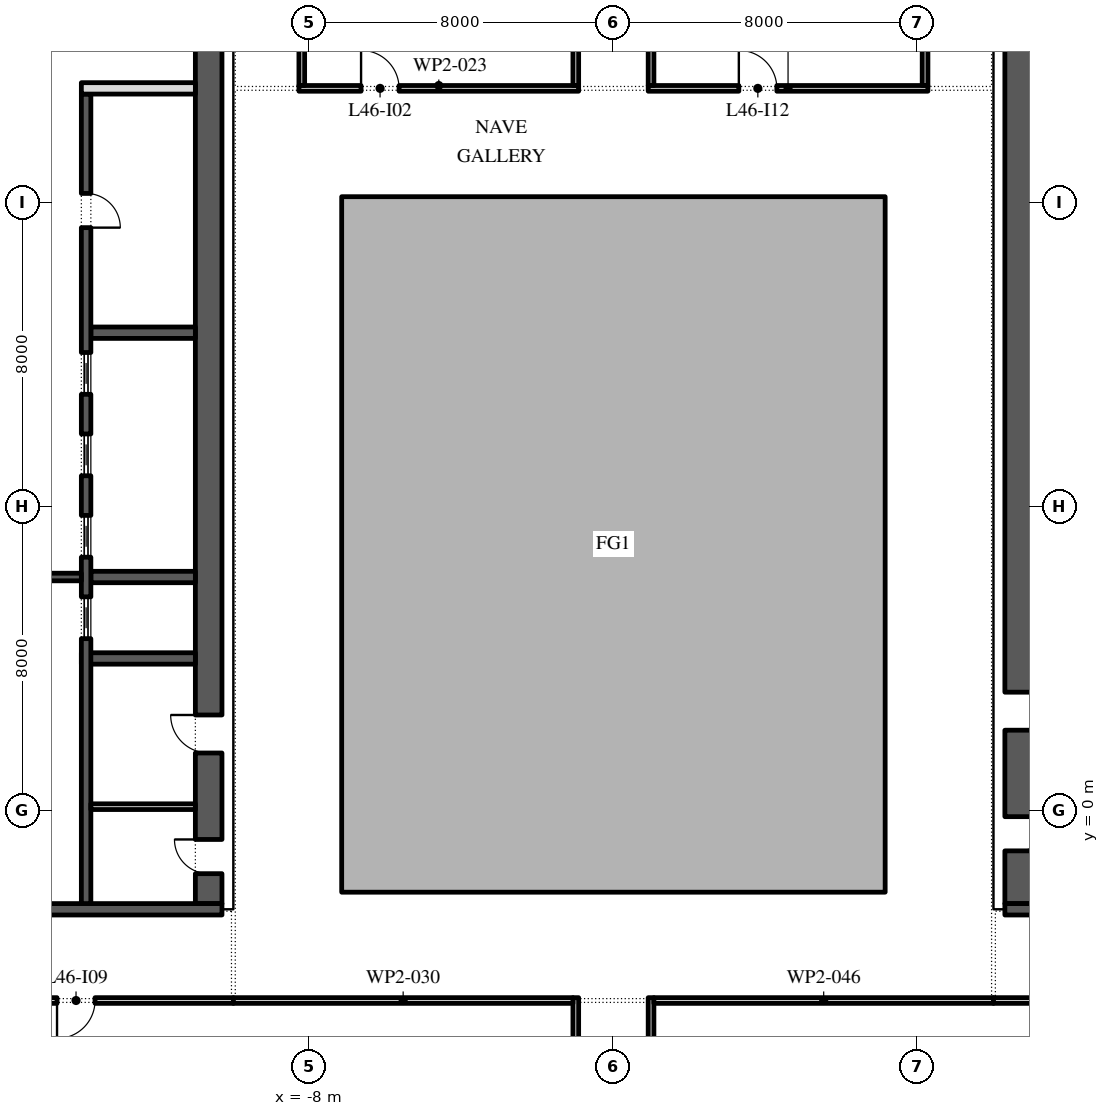
"""IFC4 building model, lengths in metres.
Left out: names, types, materials, properties, quantities, classifications, styles, units other than length and angle.
Written with IfcOpenShell. Run it as: python <this file> out.ifc"""

import sys

from ifc_helpers import new_model, si_unit, direction, frame, frame_2d, origin, place, context, subcontext, project, spatial, polyline, rectangle, outline, extrude, element, fill, save


model = new_model("IFC4")
c1 = context("Model", 3, precision=1e-05, world=origin(), true_north=direction((0.0, 1.0)))
c2 = subcontext(c1, "Body", "Model", "MODEL_VIEW")
j1 = project(units=[si_unit("LENGTHUNIT", "METRE"), si_unit("PLANEANGLEUNIT", "RADIAN")], contexts=[c1])
p1 = place(None, origin())
s1 = spatial("IfcSite", under=j1, at=p1, CompositionType="ELEMENT")
p2 = place(p1, origin())
s2 = spatial("IfcBuilding", under=s1, at=p2, CompositionType="ELEMENT")
p3 = place(p2, frame((0.0, 0.0, 209.4)))
s3 = spatial("IfcBuildingStorey", under=s2, at=p3, CompositionType="ELEMENT", Elevation=209.4)
p4 = place(p3, origin())
e1 = element("IfcWall", 1, at=p4, inside=s3, PredefinedType="STANDARD", context=c2, shape_type="SweptSolid", body=[
    extrude(outline(polyline([(-7.15, -2.15), (7.15, -2.15), (7.15, 16.15), (-7.15, 16.15), (-7.15, -2.15)]), holes=[polyline([(-7.0, -2.0), (-7.0, 16.0), (7.0, 16.0), (7.0, -2.0), (-7.0, -2.0)])]), origin(), (0.0, 0.0, 1.0), 4.0),
])
p5 = place(p3, frame((-10.65, -2.45, 0.0), z_axis=(0.0, 0.0, 1.0), x_axis=(0.0, 1.0, 0.0)))
e2 = element("IfcWall", 2, at=p5, inside=s3, PredefinedType="SHEAR", context=c2, shape_type="SweptSolid", body=[
    extrude(rectangle(XDim=27.9, YDim=0.7, at=frame_2d((13.95, 0.0))), origin(), (0.0, 0.0, 1.0), 4.0),
])
p6 = place(p5, frame((23.65, 0.0, 0.0)))
e3 = element("IfcOpeningElement", 3, at=p6, cuts=e2, PredefinedType="OPENING", context=c2, shape_type="SweptSolid", body=[
    extrude(rectangle(XDim=2.4, YDim=2.1, at=frame_2d((1.2, 1.05))), frame((0.0, 0.36, 0.0), z_axis=(0.0, -1.0, 0.0), x_axis=(1.0, 0.0, 0.0)), (0.0, 0.0, 1.0), 0.72),
])
p7 = place(p5, frame((0.788, 0.0, 0.0)))
e4 = element("IfcOpeningElement", 4, at=p7, cuts=e2, PredefinedType="OPENING", context=c2, shape_type="SweptSolid", body=[
    extrude(rectangle(XDim=0.9, YDim=2.1, at=frame_2d((0.45, 1.05))), frame((0.0, 0.36, 0.0), z_axis=(0.0, -1.0, 0.0), x_axis=(1.0, 0.0, 0.0)), (0.0, 0.0, 1.0), 0.72),
])
p8 = place(p5, frame((3.962, 0.0, 0.0)))
e5 = element("IfcOpeningElement", 5, at=p8, cuts=e2, PredefinedType="OPENING", context=c2, shape_type="SweptSolid", body=[
    extrude(rectangle(XDim=1.0, YDim=2.1, at=frame_2d((0.5, 1.05))), frame((0.0, 0.36, 0.0), z_axis=(0.0, -1.0, 0.0), x_axis=(1.0, 0.0, 0.0)), (0.0, 0.0, 1.0), 0.72),
])
p9 = place(p3, frame((-21.7, -2.6, 0.0), z_axis=(0.0, 0.0, 1.0), x_axis=(1.0, 0.0, 0.0)))
e6 = element("IfcWall", 6, at=p9, inside=s3, PredefinedType="SHEAR", context=c2, shape_type="SweptSolid", body=[
    extrude(rectangle(XDim=11.4, YDim=0.3, at=frame_2d((5.7, 0.0))), origin(), (0.0, 0.0, 1.0), 4.0),
])
p10 = place(p3, frame((-14.0, 4.0, 0.0), z_axis=(0.0, 0.0, 1.0), x_axis=(1.0, 0.0, 0.0)))
e7 = element("IfcWall", 7, at=p10, inside=s3, PredefinedType="SHEAR", context=c2, shape_type="SweptSolid", body=[
    extrude(rectangle(XDim=3.0, YDim=0.3, at=frame_2d((1.5, 0.0))), origin(), (0.0, 0.0, 1.0), 4.0),
])
for number, where, z_axis, x_axis in (
    (8, (-13.75, 6.143, 0.0), (0.0, 0.0, 1.0), (1.0, 0.0, 0.0)),
    (9, (-13.75, 12.571, 0.0), (0.0, 0.0, 1.0), (1.0, 0.0, 0.0)),
):
    element("IfcWall", number, at=place(p3, frame(where, z_axis=z_axis, x_axis=x_axis)), inside=s3, PredefinedType="SHEAR", context=c2, shape_type="SweptSolid", body=[
        extrude(rectangle(XDim=2.75, YDim=0.3, at=frame_2d((1.375, 0.0))), origin(), (0.0, 0.0, 1.0), 4.0),
    ])
p11 = place(p3, frame((-13.875, -2.45, 0.0), z_axis=(0.0, 0.0, 1.0), x_axis=(0.0, 1.0, 0.0)))
e10 = element("IfcWall", 10, at=p11, inside=s3, PredefinedType="SHEAR", context=c2, shape_type="SweptSolid", body=[
    extrude(rectangle(XDim=21.3, YDim=0.25, at=frame_2d((10.65, 0.0))), origin(), (0.0, 0.0, 1.0), 4.0),
])
p12 = place(p11, frame((17.786, 0.0, 0.0)))
e11 = element("IfcOpeningElement", 11, at=p12, cuts=e10, PredefinedType="OPENING", context=c2, shape_type="SweptSolid", body=[
    extrude(rectangle(XDim=0.9, YDim=2.1, at=frame_2d((0.45, 1.05))), frame((0.0, 0.135, 0.0), z_axis=(0.0, -1.0, 0.0), x_axis=(1.0, 0.0, 0.0)), (0.0, 0.0, 1.0), 0.27),
])
p13 = place(p11, frame((6.971, 0.0, 0.0)))
e12 = element("IfcOpeningElement", 12, at=p13, cuts=e10, PredefinedType="OPENING", context=c2, shape_type="SweptSolid", body=[
    extrude(rectangle(XDim=1.1, YDim=2.1, at=frame_2d((0.55, 1.05))), frame((0.0, 0.135, 0.0), z_axis=(0.0, -1.0, 0.0), x_axis=(1.0, 0.0, 0.0)), (0.0, 0.0, 1.0), 0.27),
])
p14 = place(p11, frame((9.114, 0.0, 0.0)))
e13 = element("IfcOpeningElement", 13, at=p14, cuts=e10, PredefinedType="OPENING", context=c2, shape_type="SweptSolid", body=[
    extrude(rectangle(XDim=1.1, YDim=2.1, at=frame_2d((0.55, 1.05))), frame((0.0, 0.135, 0.0), z_axis=(0.0, -1.0, 0.0), x_axis=(1.0, 0.0, 0.0)), (0.0, 0.0, 1.0), 0.27),
])
p15 = place(p11, frame((11.257, 0.0, 0.0)))
e14 = element("IfcOpeningElement", 14, at=p15, cuts=e10, PredefinedType="OPENING", context=c2, shape_type="SweptSolid", body=[
    extrude(rectangle(XDim=1.1, YDim=2.1, at=frame_2d((0.55, 1.05))), frame((0.0, 0.135, 0.0), z_axis=(0.0, -1.0, 0.0), x_axis=(1.0, 0.0, 0.0)), (0.0, 0.0, 1.0), 0.27),
])
p16 = place(p11, frame((13.4, 0.0, 0.0)))
e15 = element("IfcOpeningElement", 15, at=p16, cuts=e10, PredefinedType="OPENING", context=c2, shape_type="SweptSolid", body=[
    extrude(rectangle(XDim=1.1, YDim=2.1, at=frame_2d((0.55, 1.05))), frame((0.0, 0.135, 0.0), z_axis=(0.0, -1.0, 0.0), x_axis=(1.0, 0.0, 0.0)), (0.0, 0.0, 1.0), 0.27),
])
p17 = place(p3, frame((-14.0, 19.0, 0.0), z_axis=(0.0, 0.0, 1.0), x_axis=(1.0, 0.0, 0.0)))
e16 = element("IfcWall", 16, at=p17, inside=s3, PredefinedType="PARTITIONING", context=c2, shape_type="SweptSolid", body=[
    extrude(rectangle(XDim=3.0, YDim=0.3, at=frame_2d((1.5, 0.0))), origin(), (0.0, 0.0, 1.0), 4.0),
])
p18 = place(p3, frame((-18.0, 6.143, 0.0), z_axis=(0.0, 0.0, 1.0), x_axis=(1.0, 0.0, 0.0)))
e17 = element("IfcWall", 17, at=p18, inside=s3, PredefinedType="SHEAR", context=c2, shape_type="SweptSolid", body=[
    extrude(rectangle(XDim=4.0, YDim=0.2, at=frame_2d((2.0, 0.0))), origin(), (0.0, 0.0, 1.0), 4.0),
])
p19 = place(p18, frame((1.4, 0.0, 0.0)))
e18 = element("IfcOpeningElement", 18, at=p19, cuts=e17, PredefinedType="OPENING", context=c2, shape_type="SweptSolid", body=[
    extrude(rectangle(XDim=1.2, YDim=2.1, at=frame_2d((0.6, 1.05))), frame((0.0, 0.11, 0.0), z_axis=(0.0, -1.0, 0.0), x_axis=(1.0, 0.0, 0.0)), (0.0, 0.0, 1.0), 0.22),
])
p20 = place(p3, frame((-13.75, 0.1, 0.0), z_axis=(0.0, 0.0, 1.0), x_axis=(1.0, 0.0, 0.0)))
e19 = element("IfcWall", 19, at=p20, inside=s3, PredefinedType="PARTITIONING", context=c2, shape_type="SweptSolid", body=[
    extrude(rectangle(XDim=2.75, YDim=0.15, at=frame_2d((1.375, 0.0))), origin(), (0.0, 0.0, 1.0), 4.0),
])
p21 = place(p3, frame((10.65, -2.45, 0.0), z_axis=(0.0, 0.0, 1.0), x_axis=(0.0, 1.0, 0.0)))
e20 = element("IfcWall", 20, at=p21, inside=s3, PredefinedType="SHEAR", context=c2, shape_type="SweptSolid", body=[
    extrude(rectangle(XDim=27.9, YDim=0.7, at=frame_2d((13.95, 0.0))), origin(), (0.0, 0.0, 1.0), 4.0),
])
p22 = place(p21, frame((23.65, 0.0, 0.0)))
e21 = element("IfcOpeningElement", 21, at=p22, cuts=e20, PredefinedType="OPENING", context=c2, shape_type="SweptSolid", body=[
    extrude(rectangle(XDim=2.4, YDim=2.1, at=frame_2d((1.2, 1.05))), frame((0.0, 0.36, 0.0), z_axis=(0.0, -1.0, 0.0), x_axis=(1.0, 0.0, 0.0)), (0.0, 0.0, 1.0), 0.72),
])
p23 = place(p21, frame((1.387, 0.0, 0.0)))
e22 = element("IfcOpeningElement", 22, at=p23, cuts=e20, PredefinedType="OPENING", context=c2, shape_type="SweptSolid", body=[
    extrude(rectangle(XDim=0.9, YDim=2.1, at=frame_2d((0.45, 1.05))), frame((0.0, 0.36, 0.0), z_axis=(0.0, -1.0, 0.0), x_axis=(1.0, 0.0, 0.0)), (0.0, 0.0, 1.0), 0.72),
])
p24 = place(p21, frame((4.562, 0.0, 0.0)))
e23 = element("IfcOpeningElement", 23, at=p24, cuts=e20, PredefinedType="OPENING", context=c2, shape_type="SweptSolid", body=[
    extrude(rectangle(XDim=1.0, YDim=2.1, at=frame_2d((0.5, 1.05))), frame((0.0, 0.36, 0.0), z_axis=(0.0, -1.0, 0.0), x_axis=(1.0, 0.0, 0.0)), (0.0, 0.0, 1.0), 0.72),
])
p25 = place(p3, frame((10.3, -2.6, 0.0), z_axis=(0.0, 0.0, 1.0), x_axis=(1.0, 0.0, 0.0)))
e24 = element("IfcWall", 24, at=p25, inside=s3, PredefinedType="SHEAR", context=c2, shape_type="SweptSolid", body=[
    extrude(rectangle(XDim=11.4, YDim=0.3, at=frame_2d((5.7, 0.0))), origin(), (0.0, 0.0, 1.0), 4.0),
])
p26 = place(p3, frame((-10.0, -5.0, 0.0), z_axis=(0.0, 0.0, 1.0), x_axis=(-1.0, 0.0, 0.0)))
e25 = element("IfcWall", 25, at=p26, inside=s3, PredefinedType="PARTITIONING", context=c2, shape_type="SweptSolid", body=[
    extrude(rectangle(XDim=13.715, YDim=0.15, at=frame_2d((6.857, 0.0))), origin(), (0.0, 0.0, 1.0), 4.0),
])
p27 = place(p26, frame((3.64, 0.0, 0.0)))
e26 = element("IfcOpeningElement", 26, at=p27, cuts=e25, PredefinedType="OPENING", context=c2, shape_type="SweptSolid", body=[
    extrude(rectangle(XDim=1.0, YDim=2.1, at=frame_2d((0.5, 1.05))), frame((0.0, 0.085, 0.0), z_axis=(0.0, -1.0, 0.0), x_axis=(1.0, 0.0, 0.0)), (0.0, 0.0, 1.0), 0.17),
])
p28 = place(p3, frame((-8.275, 19.0, 0.0), z_axis=(0.0, 0.0, 1.0), x_axis=(1.0, 0.0, 0.0)))
e27 = element("IfcWall", 27, at=p28, inside=s3, PredefinedType="PARTITIONING", context=c2, shape_type="SweptSolid", body=[
    extrude(rectangle(XDim=7.36, YDim=0.15, at=frame_2d((3.68, 0.0))), origin(), (0.0, 0.0, 1.0), 4.0),
])
p29 = place(p28, frame((1.635, 0.0, 0.0)))
e28 = element("IfcOpeningElement", 28, at=p29, cuts=e27, PredefinedType="OPENING", context=c2, shape_type="SweptSolid", body=[
    extrude(rectangle(XDim=1.0, YDim=2.1, at=frame_2d((0.5, 1.05))), frame((0.0, 0.085, 0.0), z_axis=(0.0, -1.0, 0.0), x_axis=(1.0, 0.0, 0.0)), (0.0, 0.0, 1.0), 0.17),
])
p30 = place(p3, frame((-8.2, 22.31, 0.0), z_axis=(0.0, 0.0, 1.0), x_axis=(0.0, -1.0, 0.0)))
e29 = element("IfcWall", 29, at=p30, inside=s3, PredefinedType="PARTITIONING", context=c2, shape_type="SweptSolid", body=[
    extrude(rectangle(XDim=3.235, YDim=0.15, at=frame_2d((1.618, 0.0))), origin(), (0.0, 0.0, 1.0), 4.0),
])
p31 = place(p3, frame((-0.99, -11.17, 0.0), z_axis=(0.0, 0.0, 1.0), x_axis=(0.0, 1.0, 0.0)))
e30 = element("IfcWall", 30, at=p31, inside=s3, PredefinedType="PARTITIONING", context=c2, shape_type="SweptSolid", body=[
    extrude(rectangle(XDim=6.245, YDim=0.15, at=frame_2d((3.123, 0.0))), origin(), (0.0, 0.0, 1.0), 4.0),
])
p32 = place(p3, frame((-1.065, -5.0, 0.0), z_axis=(0.0, 0.0, 1.0), x_axis=(-1.0, 0.0, 0.0)))
e31 = element("IfcWall", 31, at=p32, inside=s3, PredefinedType="PARTITIONING", context=c2, shape_type="SweptSolid", body=[
    extrude(rectangle(XDim=8.935, YDim=0.15, at=frame_2d((4.468, 0.0))), origin(), (0.0, 0.0, 1.0), 4.0),
])
p33 = place(p3, frame((-0.99, 19.075, 0.0), z_axis=(0.0, 0.0, 1.0), x_axis=(0.0, 1.0, 0.0)))
e32 = element("IfcWall", 32, at=p33, inside=s3, PredefinedType="PARTITIONING", context=c2, shape_type="SweptSolid", body=[
    extrude(rectangle(XDim=3.185, YDim=0.15, at=frame_2d((1.593, 0.0))), origin(), (0.0, 0.0, 1.0), 4.0),
])
p34 = place(p3, frame((0.99, -4.925, 0.0), z_axis=(0.0, 0.0, 1.0), x_axis=(0.0, -1.0, 0.0)))
e33 = element("IfcWall", 33, at=p34, inside=s3, PredefinedType="PARTITIONING", context=c2, shape_type="SweptSolid", body=[
    extrude(rectangle(XDim=11.371, YDim=0.15, at=frame_2d((5.686, 0.0))), origin(), (0.0, 0.0, 1.0), 4.0),
])
p35 = place(p34, frame((2.945, 0.0, 0.0)))
e34 = element("IfcOpeningElement", 34, at=p35, cuts=e33, PredefinedType="OPENING", context=c2, shape_type="SweptSolid", body=[
    extrude(rectangle(XDim=1.0, YDim=2.1, at=frame_2d((0.5, 1.05))), frame((0.0, 0.085, 0.0), z_axis=(0.0, -1.0, 0.0), x_axis=(1.0, 0.0, 0.0)), (0.0, 0.0, 1.0), 0.17),
])
p36 = place(p3, frame((0.915, 19.0, 0.0), z_axis=(0.0, 0.0, 1.0), x_axis=(1.0, 0.0, 0.0)))
e35 = element("IfcWall", 35, at=p36, inside=s3, PredefinedType="PARTITIONING", context=c2, shape_type="SweptSolid", body=[
    extrude(rectangle(XDim=7.36, YDim=0.15, at=frame_2d((3.68, 0.0))), origin(), (0.0, 0.0, 1.0), 4.0),
])
p37 = place(p36, frame((2.385, 0.0, 0.0)))
e36 = element("IfcOpeningElement", 36, at=p37, cuts=e35, PredefinedType="OPENING", context=c2, shape_type="SweptSolid", body=[
    extrude(rectangle(XDim=1.0, YDim=2.1, at=frame_2d((0.5, 1.05))), frame((0.0, 0.085, 0.0), z_axis=(0.0, -1.0, 0.0), x_axis=(1.0, 0.0, 0.0)), (0.0, 0.0, 1.0), 0.17),
])
p38 = place(p3, frame((0.99, 22.31, 0.0), z_axis=(0.0, 0.0, 1.0), x_axis=(0.0, -1.0, 0.0)))
e37 = element("IfcWall", 37, at=p38, inside=s3, PredefinedType="PARTITIONING", context=c2, shape_type="SweptSolid", body=[
    extrude(rectangle(XDim=3.235, YDim=0.15, at=frame_2d((1.618, 0.0))), origin(), (0.0, 0.0, 1.0), 4.0),
])
p39 = place(p3, frame((8.2, 19.075, 0.0), z_axis=(0.0, 0.0, 1.0), x_axis=(0.0, 1.0, 0.0)))
e38 = element("IfcWall", 38, at=p39, inside=s3, PredefinedType="PARTITIONING", context=c2, shape_type="SweptSolid", body=[
    extrude(rectangle(XDim=3.185, YDim=0.15, at=frame_2d((1.593, 0.0))), origin(), (0.0, 0.0, 1.0), 4.0),
])
p40 = place(p3, frame((10.0, -5.0, 0.0), z_axis=(0.0, 0.0, 1.0), x_axis=(-1.0, 0.0, 0.0)))
e39 = element("IfcWall", 39, at=p40, inside=s3, PredefinedType="PARTITIONING", context=c2, shape_type="SweptSolid", body=[
    extrude(rectangle(XDim=8.935, YDim=0.15, at=frame_2d((4.468, 0.0))), origin(), (0.0, 0.0, 1.0), 4.0),
])
p41 = place(p3, frame((14.48, -5.0, 0.0), z_axis=(0.0, 0.0, 1.0), x_axis=(-1.0, 0.0, 0.0)))
e40 = element("IfcWall", 40, at=p41, inside=s3, PredefinedType="PARTITIONING", context=c2, shape_type="SweptSolid", body=[
    extrude(rectangle(XDim=4.48, YDim=0.15, at=frame_2d((2.24, 0.0))), origin(), (0.0, 0.0, 1.0), 4.0),
])
p42 = place(p12, frame((0.9, -0.2, 0.0), z_axis=(0.0, 0.0, 1.0), x_axis=(-1.0, 0.0, 0.0)))
e41 = element("IfcDoor", 41, at=p42, inside=s3, OperationType="SINGLE_SWING_LEFT", PredefinedType="DOOR", context=c2, shape_type="SweptSolid", body=[
    extrude(rectangle(XDim=0.9, YDim=2.1, at=frame_2d((0.45, 1.05))), frame((0.0, -0.075, 0.0), z_axis=(0.0, -1.0, 0.0), x_axis=(1.0, 0.0, 0.0)), (0.0, 0.0, 1.0), 0.05),
])
fill(e11, e41)
p43 = place(p13, origin())
e42 = element("IfcDoor", 42, at=p43, inside=s3, OperationType="SLIDING_TO_LEFT", PredefinedType="DOOR", context=c2, shape_type="SweptSolid", body=[
    extrude(rectangle(XDim=1.1, YDim=2.1, at=frame_2d((0.55, 1.05))), frame((0.0, 0.025, 0.0), z_axis=(0.0, -1.0, 0.0), x_axis=(1.0, 0.0, 0.0)), (0.0, 0.0, 1.0), 0.05),
])
fill(e12, e42)
p44 = place(p14, origin())
e43 = element("IfcDoor", 43, at=p44, inside=s3, OperationType="SLIDING_TO_LEFT", PredefinedType="DOOR", context=c2, shape_type="SweptSolid", body=[
    extrude(rectangle(XDim=1.1, YDim=2.1, at=frame_2d((0.55, 1.05))), frame((0.0, 0.025, 0.0), z_axis=(0.0, -1.0, 0.0), x_axis=(1.0, 0.0, 0.0)), (0.0, 0.0, 1.0), 0.05),
])
fill(e13, e43)
p45 = place(p15, origin())
e44 = element("IfcDoor", 44, at=p45, inside=s3, OperationType="SLIDING_TO_LEFT", PredefinedType="DOOR", context=c2, shape_type="SweptSolid", body=[
    extrude(rectangle(XDim=1.1, YDim=2.1, at=frame_2d((0.55, 1.05))), frame((0.0, 0.025, 0.0), z_axis=(0.0, -1.0, 0.0), x_axis=(1.0, 0.0, 0.0)), (0.0, 0.0, 1.0), 0.05),
])
fill(e14, e44)
p46 = place(p16, origin())
e45 = element("IfcDoor", 45, at=p46, inside=s3, OperationType="SLIDING_TO_LEFT", PredefinedType="DOOR", context=c2, shape_type="SweptSolid", body=[
    extrude(rectangle(XDim=1.1, YDim=2.1, at=frame_2d((0.55, 1.05))), frame((0.0, 0.025, 0.0), z_axis=(0.0, -1.0, 0.0), x_axis=(1.0, 0.0, 0.0)), (0.0, 0.0, 1.0), 0.05),
])
fill(e15, e45)
p47 = place(p7, origin())
e46 = element("IfcDoor", 46, at=p47, inside=s3, OperationType="SINGLE_SWING_LEFT", PredefinedType="DOOR", context=c2, shape_type="SweptSolid", body=[
    extrude(rectangle(XDim=0.9, YDim=2.1, at=frame_2d((0.45, 1.05))), frame((0.0, 0.35, 0.0), z_axis=(0.0, -1.0, 0.0), x_axis=(1.0, 0.0, 0.0)), (0.0, 0.0, 1.0), 0.05),
])
fill(e4, e46)
p48 = place(p8, origin())
e47 = element("IfcDoor", 47, at=p48, inside=s3, OperationType="SINGLE_SWING_LEFT", PredefinedType="DOOR", context=c2, shape_type="SweptSolid", body=[
    extrude(rectangle(XDim=1.0, YDim=2.1, at=frame_2d((0.5, 1.05))), frame((0.0, 0.35, 0.0), z_axis=(0.0, -1.0, 0.0), x_axis=(1.0, 0.0, 0.0)), (0.0, 0.0, 1.0), 0.05),
])
fill(e5, e47)
p49 = place(p29, origin())
e48 = element("IfcDoor", 48, at=p49, inside=s3, OperationType="SINGLE_SWING_RIGHT", PredefinedType="DOOR", context=c2, shape_type="SweptSolid", body=[
    extrude(rectangle(XDim=1.0, YDim=2.1, at=frame_2d((0.5, 1.05))), frame((0.0, 0.025, 0.0), z_axis=(0.0, -1.0, 0.0), x_axis=(1.0, 0.0, 0.0)), (0.0, 0.0, 1.0), 0.05),
])
fill(e28, e48)
p50 = place(p27, origin())
e49 = element("IfcDoor", 49, at=p50, inside=s3, OperationType="SINGLE_SWING_LEFT", PredefinedType="DOOR", context=c2, shape_type="SweptSolid", body=[
    extrude(rectangle(XDim=1.0, YDim=2.1, at=frame_2d((0.5, 1.05))), frame((0.0, 0.025, 0.0), z_axis=(0.0, -1.0, 0.0), x_axis=(1.0, 0.0, 0.0)), (0.0, 0.0, 1.0), 0.05),
])
fill(e26, e49)
p51 = place(p37, origin())
e50 = element("IfcDoor", 50, at=p51, inside=s3, OperationType="SINGLE_SWING_RIGHT", PredefinedType="DOOR", context=c2, shape_type="SweptSolid", body=[
    extrude(rectangle(XDim=1.0, YDim=2.1, at=frame_2d((0.5, 1.05))), frame((0.0, 0.025, 0.0), z_axis=(0.0, -1.0, 0.0), x_axis=(1.0, 0.0, 0.0)), (0.0, 0.0, 1.0), 0.05),
])
fill(e36, e50)
save(model, sys.argv[1])
